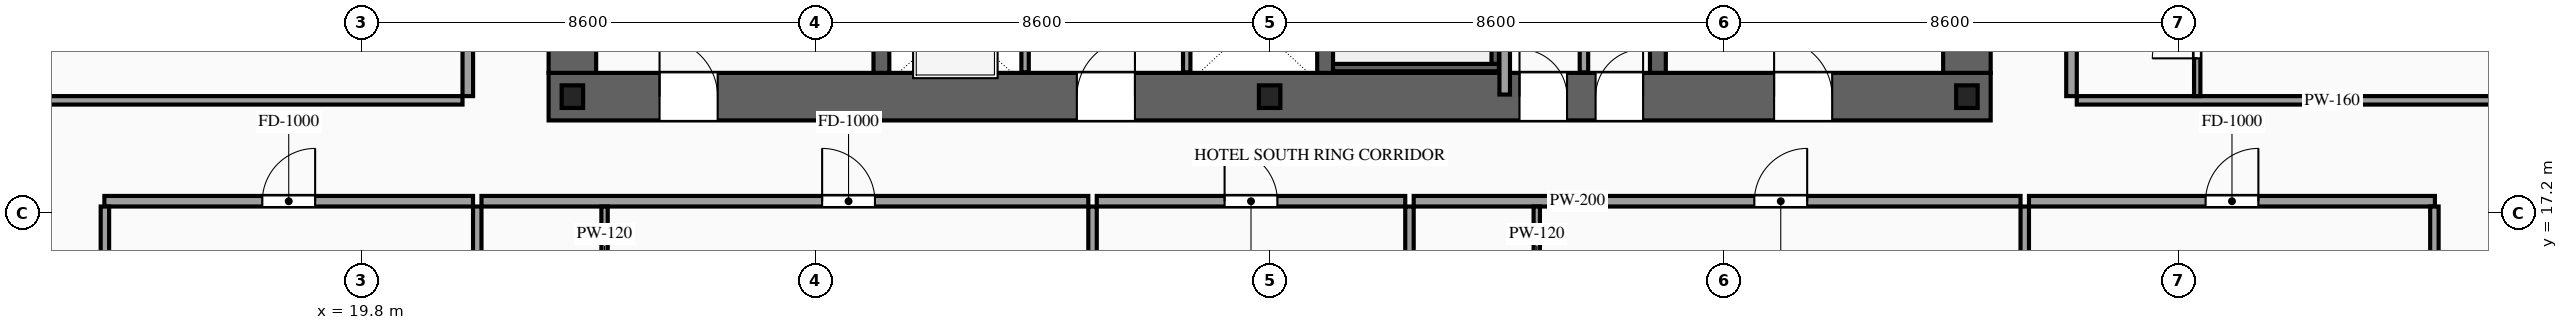
"""IFC4 building model, lengths in metres.
Left out: names, types, materials, properties, quantities, classifications, styles, units other than length and angle.
Written with IfcOpenShell. Run it as: python <this file> out.ifc"""

import sys

from ifc_helpers import new_model, si_unit, direction, frame, frame_2d, origin, origin_2d, place, context, subcontext, project, spatial, rectangle, i_section, extrude, source, transform, mapped, element, fill, save


model = new_model("IFC4")
c1 = context("Model", 3, precision=1e-05, world=origin(), true_north=direction((0.0, 1.0)))
c2 = subcontext(c1, "Body", "Model", "MODEL_VIEW")
j1 = project(units=[si_unit("LENGTHUNIT", "METRE"), si_unit("PLANEANGLEUNIT", "RADIAN")], contexts=[c1])
p1 = place(None, origin())
s1 = spatial("IfcSite", under=j1, at=p1, CompositionType="ELEMENT")
p2 = place(p1, origin())
s2 = spatial("IfcBuilding", under=s1, at=p2, CompositionType="ELEMENT")
p3 = place(p2, frame((0.0, 0.0, 78.4)))
s3 = spatial("IfcBuildingStorey", under=s2, at=p3, CompositionType="ELEMENT", Elevation=78.4)
p4 = place(p3, frame((23.35, 19.4, 0.0), z_axis=(0.0, 0.0, 1.0), x_axis=(1.0, 0.0, 0.0)))
e1 = element("IfcWall", 1, at=p4, inside=s3, PredefinedType="SHEAR", context=c2, shape_type="SweptSolid", body=[
    extrude(rectangle(XDim=27.3, YDim=0.9, at=frame_2d((13.65, 0.0))), origin(), (0.0, 0.0, 1.0), 3.6),
])
p5 = place(p4, frame((2.1, 0.0, 0.0)))
e2 = element("IfcOpeningElement", 2, at=p5, cuts=e1, PredefinedType="OPENING", context=c2, shape_type="SweptSolid", body=[
    extrude(rectangle(XDim=1.1, YDim=2.2, at=frame_2d((0.55, 1.1))), frame((0.0, 0.465, 0.0), z_axis=(0.0, -1.0, 0.0), x_axis=(1.0, 0.0, 0.0)), (0.0, 0.0, 1.0), 0.93),
])
p6 = place(p4, frame((10.0, 0.0, 0.0)))
e3 = element("IfcOpeningElement", 3, at=p6, cuts=e1, PredefinedType="OPENING", context=c2, shape_type="SweptSolid", body=[
    extrude(rectangle(XDim=1.1, YDim=2.2, at=frame_2d((0.55, 1.1))), frame((0.0, 0.465, 0.0), z_axis=(0.0, -1.0, 0.0), x_axis=(1.0, 0.0, 0.0)), (0.0, 0.0, 1.0), 0.93),
])
p7 = place(p4, frame((23.2, 0.0, 0.0)))
e4 = element("IfcOpeningElement", 4, at=p7, cuts=e1, PredefinedType="OPENING", context=c2, shape_type="SweptSolid", body=[
    extrude(rectangle(XDim=1.1, YDim=2.2, at=frame_2d((0.55, 1.1))), frame((0.0, 0.465, 0.0), z_axis=(0.0, -1.0, 0.0), x_axis=(1.0, 0.0, 0.0)), (0.0, 0.0, 1.0), 0.93),
])
p8 = place(p4, frame((19.82, 0.0, 0.0)))
e5 = element("IfcOpeningElement", 5, at=p8, cuts=e1, PredefinedType="OPENING", context=c2, shape_type="SweptSolid", body=[
    extrude(rectangle(XDim=0.9, YDim=2.15, at=frame_2d((0.45, 1.075))), frame((0.0, 0.465, 0.0), z_axis=(0.0, -1.0, 0.0), x_axis=(1.0, 0.0, 0.0)), (0.0, 0.0, 1.0), 0.93),
])
p9 = place(p4, frame((18.38, 0.0, 0.0)))
e6 = element("IfcOpeningElement", 6, at=p9, cuts=e1, PredefinedType="OPENING", context=c2, shape_type="SweptSolid", body=[
    extrude(rectangle(XDim=0.9, YDim=2.15, at=frame_2d((0.45, 1.075))), frame((0.0, 0.465, 0.0), z_axis=(0.0, -1.0, 0.0), x_axis=(1.0, 0.0, 0.0)), (0.0, 0.0, 1.0), 0.93),
])
m1 = source(origin(), c2, "Body", "SweptSolid", [
    extrude(rectangle(XDim=11.9, YDim=0.9, at=frame_2d((5.95, 0.0))), origin(), (0.0, 0.0, 1.0), 3.6),
])
for number, where, z_axis, x_axis in (
    (7, (23.8, 19.85, 0.0), (0.0, 0.0, 1.0), (0.0, 1.0, 0.0)),
    (8, (50.2, 19.85, 0.0), (0.0, 0.0, 1.0), (0.0, 1.0, 0.0)),
):
    element("IfcWall", number, at=place(p3, frame(where, z_axis=z_axis, x_axis=x_axis)), inside=s3, PredefinedType="SHEAR", context=c2, shape_type="MappedRepresentation", body=[
        mapped(m1, transform((0.0, 0.0, 0.0), scale=1.0)),
    ])
m2 = source(origin(), c2, "Body", "SweptSolid", [
    extrude(rectangle(XDim=11.9, YDim=0.3, at=frame_2d((5.95, 0.0))), origin(), (0.0, 0.0, 1.0), 3.6),
])
for number, where, z_axis, x_axis in (
    (9, (29.65, 19.85, 0.0), (0.0, 0.0, 1.0), (0.0, 1.0, 0.0)),
    (10, (38.05, 19.85, 0.0), (0.0, 0.0, 1.0), (0.0, 1.0, 0.0)),
    (11, (44.35, 19.85, 0.0), (0.0, 0.0, 1.0), (0.0, 1.0, 0.0)),
):
    element("IfcWall", number, at=place(p3, frame(where, z_axis=z_axis, x_axis=x_axis)), inside=s3, PredefinedType="SOLIDWALL", context=c2, shape_type="MappedRepresentation", body=[
        mapped(m2, transform((0.0, 0.0, 0.0), scale=1.0)),
    ])
m3 = source(origin(), c2, "Body", "SweptSolid", [
    extrude(i_section(OverallWidth=0.407, OverallDepth=0.428, WebThickness=0.02, FlangeThickness=0.035, at=origin_2d()), origin(), (0.0, 0.0, 1.0), 3.6),
])
for number, where, z_axis, x_axis in (
    (12, (23.8, 19.4, 0.0), (0.0, 0.0, 1.0), (1.0, 0.0, 0.0)),
    (13, (37.0, 19.4, 0.0), (0.0, 0.0, 1.0), (1.0, 0.0, 0.0)),
    (14, (50.2, 19.4, 0.0), (0.0, 0.0, 1.0), (1.0, 0.0, 0.0)),
):
    element("IfcColumn", number, at=place(p3, frame(where, z_axis=z_axis, x_axis=x_axis)), inside=s3, PredefinedType="COLUMN", context=c2, shape_type="MappedRepresentation", body=[
        mapped(m3, transform((0.0, 0.0, 0.0), scale=1.0)),
    ])
p10 = place(p3, frame((32.37, 19.86, 0.0), z_axis=(0.0, 0.0, 1.0), x_axis=(0.0, 1.0, 0.0)))
e15 = element("IfcWall", 15, at=p10, inside=s3, PredefinedType="SOLIDWALL", context=c2, shape_type="SweptSolid", body=[
    extrude(rectangle(XDim=2.04, YDim=0.14, at=frame_2d((1.02, 0.0))), origin(), (0.0, 0.0, 1.0), 3.38),
])
p11 = place(p10, frame((0.47, 0.0, 0.0)))
e16 = element("IfcOpeningElement", 16, at=p11, cuts=e15, PredefinedType="OPENING", context=c2, shape_type="SweptSolid", body=[
    extrude(rectangle(XDim=1.1, YDim=2.2, at=frame_2d((0.55, 1.1))), frame((0.0, 0.085, 0.0), z_axis=(0.0, -1.0, 0.0), x_axis=(1.0, 0.0, 0.0)), (0.0, 0.0, 1.0), 0.17),
])
m4 = source(origin(), c2, "Body", "SweptSolid", [
    extrude(rectangle(XDim=2.04, YDim=0.14, at=frame_2d((1.02, 0.0))), origin(), (0.0, 0.0, 1.0), 3.38),
])
p12 = place(p3, frame((35.43, 19.86, 0.0), z_axis=(0.0, 0.0, 1.0), x_axis=(0.0, 1.0, 0.0)))
e17 = element("IfcWall", 17, at=p12, inside=s3, PredefinedType="SOLIDWALL", context=c2, shape_type="MappedRepresentation", body=[
    mapped(m4, transform((0.0, 0.0, 0.0), scale=1.0)),
])
m5 = source(origin(), c2, "Body", "SweptSolid", [
    extrude(rectangle(XDim=3.14, YDim=0.14, at=frame_2d((1.57, 0.0))), origin(), (0.0, 0.0, 1.0), 3.38),
])
p13 = place(p3, frame((38.2, 19.95, 0.0), z_axis=(0.0, 0.0, 1.0), x_axis=(1.0, 0.0, 0.0)))
e18 = element("IfcWall", 18, at=p13, inside=s3, PredefinedType="SOLIDWALL", context=c2, shape_type="MappedRepresentation", body=[
    mapped(m5, transform((0.0, 0.0, 0.0), scale=1.0)),
])
m6 = source(origin(), c2, "Body", "SweptSolid", [
    extrude(rectangle(XDim=8.94, YDim=0.14, at=frame_2d((4.47, 0.0))), origin(), (0.0, 0.0, 1.0), 3.38),
])
p14 = place(p3, frame((41.27, 20.02, 0.0), z_axis=(0.0, 0.0, 1.0), x_axis=(0.0, 1.0, 0.0)))
e19 = element("IfcWall", 19, at=p14, inside=s3, PredefinedType="SOLIDWALL", context=c2, shape_type="MappedRepresentation", body=[
    mapped(m6, transform((0.0, 0.0, 0.0), scale=1.0)),
])
m7 = source(origin(), c2, "Body", "SweptSolid", [
    extrude(rectangle(XDim=1.34, YDim=0.16, at=frame_2d((0.67, 0.0))), origin(), (0.0, 0.0, 1.0), 3.38),
])
p15 = place(p3, frame((42.95, 19.86, 0.0), z_axis=(0.0, 0.0, 1.0), x_axis=(0.0, 1.0, 0.0)))
e20 = element("IfcWall", 20, at=p15, inside=s3, PredefinedType="PARTITIONING", context=c2, shape_type="MappedRepresentation", body=[
    mapped(m7, transform((0.0, 0.0, 0.0), scale=1.0)),
])
m8 = source(origin(), c2, "Body", "SweptSolid", [
    extrude(rectangle(XDim=12.72, YDim=0.2, at=frame_2d((6.36, 0.0))), origin(), (0.0, 0.0, 1.0), 3.38),
])
p16 = place(p3, frame((41.45, 19.44, 0.0), z_axis=(0.0, 0.0, 1.0), x_axis=(0.0, 1.0, 0.0)))
e21 = element("IfcWall", 21, at=p16, inside=s3, PredefinedType="PARTITIONING", context=c2, shape_type="MappedRepresentation", body=[
    mapped(m8, transform((0.0, 0.0, 0.0), scale=1.0)),
])
p17 = place(p3, frame((14.94, 17.42, 0.0), z_axis=(0.0, 0.0, 1.0), x_axis=(1.0, 0.0, 0.0)))
e22 = element("IfcWall", 22, at=p17, inside=s3, PredefinedType="PARTITIONING", context=c2, shape_type="SweptSolid", body=[
    extrude(rectangle(XDim=6.979, YDim=0.2, at=frame_2d((3.49, 0.0))), origin(), (0.0, 0.0, 1.0), 3.38),
])
p18 = place(p17, frame((2.99, 0.0, 0.0)))
e23 = element("IfcOpeningElement", 23, at=p18, cuts=e22, PredefinedType="OPENING", context=c2, shape_type="SweptSolid", body=[
    extrude(rectangle(XDim=1.0, YDim=2.2, at=frame_2d((0.5, 1.1))), frame((0.0, 0.115, 0.0), z_axis=(0.0, -1.0, 0.0), x_axis=(1.0, 0.0, 0.0)), (0.0, 0.0, 1.0), 0.23),
])
m9 = source(origin(), c2, "Body", "SweptSolid", [
    extrude(rectangle(XDim=16.47, YDim=0.16, at=frame_2d((8.235, 0.0))), origin(), (0.0, 0.0, 1.0), 3.38),
])
p19 = place(p3, frame((21.999, 0.85, 0.0), z_axis=(0.0, 0.0, 1.0), x_axis=(0.0, 1.0, 0.0)))
e24 = element("IfcWall", 24, at=p19, inside=s3, PredefinedType="PARTITIONING", context=c2, shape_type="MappedRepresentation", body=[
    mapped(m9, transform((0.0, 0.0, 0.0), scale=1.0)),
])
p20 = place(p3, frame((22.079, 17.42, 0.0), z_axis=(0.0, 0.0, 1.0), x_axis=(1.0, 0.0, 0.0)))
e25 = element("IfcWall", 25, at=p20, inside=s3, PredefinedType="PARTITIONING", context=c2, shape_type="SweptSolid", body=[
    extrude(rectangle(XDim=11.488, YDim=0.2, at=frame_2d((5.744, 0.0))), origin(), (0.0, 0.0, 1.0), 3.38),
])
p21 = place(p20, frame((6.449, 0.0, 0.0)))
e26 = element("IfcOpeningElement", 26, at=p21, cuts=e25, PredefinedType="OPENING", context=c2, shape_type="SweptSolid", body=[
    extrude(rectangle(XDim=1.0, YDim=2.2, at=frame_2d((0.5, 1.1))), frame((0.0, 0.115, 0.0), z_axis=(0.0, -1.0, 0.0), x_axis=(1.0, 0.0, 0.0)), (0.0, 0.0, 1.0), 0.23),
])
p22 = place(p3, frame((33.647, 0.85, 0.0), z_axis=(0.0, 0.0, 1.0), x_axis=(0.0, 1.0, 0.0)))
e27 = element("IfcWall", 27, at=p22, inside=s3, PredefinedType="PARTITIONING", context=c2, shape_type="MappedRepresentation", body=[
    mapped(m9, transform((0.0, 0.0, 0.0), scale=1.0)),
])
m10 = source(origin(), c2, "Body", "SweptSolid", [
    extrude(rectangle(XDim=2.42, YDim=0.12, at=frame_2d((1.21, 0.0))), origin(), (0.0, 0.0, 1.0), 3.38),
])
p23 = place(p3, frame((24.409, 14.9, 0.0), z_axis=(0.0, 0.0, 1.0), x_axis=(0.0, 1.0, 0.0)))
e28 = element("IfcWall", 28, at=p23, inside=s3, PredefinedType="PARTITIONING", context=c2, shape_type="MappedRepresentation", body=[
    mapped(m10, transform((0.0, 0.0, 0.0), scale=1.0)),
])
p24 = place(p3, frame((33.727, 17.42, 0.0), z_axis=(0.0, 0.0, 1.0), x_axis=(1.0, 0.0, 0.0)))
e29 = element("IfcWall", 29, at=p24, inside=s3, PredefinedType="PARTITIONING", context=c2, shape_type="SweptSolid", body=[
    extrude(rectangle(XDim=5.84, YDim=0.2, at=frame_2d((2.92, 0.0))), origin(), (0.0, 0.0, 1.0), 3.38),
])
p25 = place(p24, frame((2.42, 0.0, 0.0)))
e30 = element("IfcOpeningElement", 30, at=p25, cuts=e29, PredefinedType="OPENING", context=c2, shape_type="SweptSolid", body=[
    extrude(rectangle(XDim=1.0, YDim=2.2, at=frame_2d((0.5, 1.1))), frame((0.0, 0.115, 0.0), z_axis=(0.0, -1.0, 0.0), x_axis=(1.0, 0.0, 0.0)), (0.0, 0.0, 1.0), 0.23),
])
p26 = place(p3, frame((39.647, 0.85, 0.0), z_axis=(0.0, 0.0, 1.0), x_axis=(0.0, 1.0, 0.0)))
e31 = element("IfcWall", 31, at=p26, inside=s3, PredefinedType="PARTITIONING", context=c2, shape_type="MappedRepresentation", body=[
    mapped(m9, transform((0.0, 0.0, 0.0), scale=1.0)),
])
p27 = place(p3, frame((39.727, 17.42, 0.0), z_axis=(0.0, 0.0, 1.0), x_axis=(1.0, 0.0, 0.0)))
e32 = element("IfcWall", 32, at=p27, inside=s3, PredefinedType="PARTITIONING", context=c2, shape_type="SweptSolid", body=[
    extrude(rectangle(XDim=11.488, YDim=0.2, at=frame_2d((5.744, 0.0))), origin(), (0.0, 0.0, 1.0), 3.38),
])
p28 = place(p27, frame((6.449, 0.0, 0.0)))
e33 = element("IfcOpeningElement", 33, at=p28, cuts=e32, PredefinedType="OPENING", context=c2, shape_type="SweptSolid", body=[
    extrude(rectangle(XDim=1.0, YDim=2.2, at=frame_2d((0.5, 1.1))), frame((0.0, 0.115, 0.0), z_axis=(0.0, -1.0, 0.0), x_axis=(1.0, 0.0, 0.0)), (0.0, 0.0, 1.0), 0.23),
])
p29 = place(p3, frame((51.295, 0.85, 0.0), z_axis=(0.0, 0.0, 1.0), x_axis=(0.0, 1.0, 0.0)))
e34 = element("IfcWall", 34, at=p29, inside=s3, PredefinedType="PARTITIONING", context=c2, shape_type="MappedRepresentation", body=[
    mapped(m9, transform((0.0, 0.0, 0.0), scale=1.0)),
])
p30 = place(p3, frame((42.057, 14.9, 0.0), z_axis=(0.0, 0.0, 1.0), x_axis=(0.0, 1.0, 0.0)))
e35 = element("IfcWall", 35, at=p30, inside=s3, PredefinedType="PARTITIONING", context=c2, shape_type="MappedRepresentation", body=[
    mapped(m10, transform((0.0, 0.0, 0.0), scale=1.0)),
])
p31 = place(p3, frame((51.375, 17.42, 0.0), z_axis=(0.0, 0.0, 1.0), x_axis=(1.0, 0.0, 0.0)))
e36 = element("IfcWall", 36, at=p31, inside=s3, PredefinedType="PARTITIONING", context=c2, shape_type="SweptSolid", body=[
    extrude(rectangle(XDim=7.685, YDim=0.2, at=frame_2d((3.843, 0.0))), origin(), (0.0, 0.0, 1.0), 3.38),
])
p32 = place(p31, frame((3.343, 0.0, 0.0)))
e37 = element("IfcOpeningElement", 37, at=p32, cuts=e36, PredefinedType="OPENING", context=c2, shape_type="SweptSolid", body=[
    extrude(rectangle(XDim=1.0, YDim=2.2, at=frame_2d((0.5, 1.1))), frame((0.0, 0.115, 0.0), z_axis=(0.0, -1.0, 0.0), x_axis=(1.0, 0.0, 0.0)), (0.0, 0.0, 1.0), 0.23),
])
m11 = source(origin(), c2, "Body", "SweptSolid", [
    extrude(rectangle(XDim=16.32, YDim=0.16, at=frame_2d((8.16, 0.0))), origin(), (0.0, 0.0, 1.0), 3.38),
])
for number, where, z_axis, x_axis in (
    (38, (14.95, 1.0, 0.0), (0.0, 0.0, 1.0), (0.0, 1.0, 0.0)),
    (39, (59.05, 1.0, 0.0), (0.0, 0.0, 1.0), (0.0, 1.0, 0.0)),
):
    element("IfcWall", number, at=place(p3, frame(where, z_axis=z_axis, x_axis=x_axis)), inside=s3, PredefinedType="PARTITIONING", context=c2, shape_type="MappedRepresentation", body=[
        mapped(m11, transform((0.0, 0.0, 0.0), scale=1.0)),
    ])
p33 = place(p3, frame((21.82, 19.41, 0.0), z_axis=(0.0, 0.0, 1.0), x_axis=(0.0, 1.0, 0.0)))
e40 = element("IfcWall", 40, at=p33, inside=s3, PredefinedType="PARTITIONING", context=c2, shape_type="SweptSolid", body=[
    extrude(rectangle(XDim=6.31, YDim=0.2, at=frame_2d((3.155, 0.0))), origin(), (0.0, 0.0, 1.0), 3.38),
])
p34 = place(p33, frame((2.655, 0.0, 0.0)))
e41 = element("IfcOpeningElement", 41, at=p34, cuts=e40, PredefinedType="OPENING", context=c2, shape_type="SweptSolid", body=[
    extrude(rectangle(XDim=1.0, YDim=2.2, at=frame_2d((0.5, 1.1))), frame((0.0, 0.115, 0.0), z_axis=(0.0, -1.0, 0.0), x_axis=(1.0, 0.0, 0.0)), (0.0, 0.0, 1.0), 0.23),
])
m12 = source(origin(), c2, "Body", "SweptSolid", [
    extrude(rectangle(XDim=9.67, YDim=0.16, at=frame_2d((4.835, 0.0))), origin(), (0.0, 0.0, 1.0), 2.875),
])
p35 = place(p3, frame((12.05, 19.33, 0.0), z_axis=(0.0, 0.0, 1.0), x_axis=(1.0, 0.0, 0.0)))
e42 = element("IfcWall", 42, at=p35, inside=s3, PredefinedType="PARTITIONING", context=c2, shape_type="MappedRepresentation", body=[
    mapped(m12, transform((0.0, 0.0, 0.0), scale=1.0)),
])
p36 = place(p3, frame((52.18, 19.41, 0.0), z_axis=(0.0, 0.0, 1.0), x_axis=(0.0, 1.0, 0.0)))
e43 = element("IfcWall", 43, at=p36, inside=s3, PredefinedType="PARTITIONING", context=c2, shape_type="SweptSolid", body=[
    extrude(rectangle(XDim=6.31, YDim=0.2, at=frame_2d((3.155, 0.0))), origin(), (0.0, 0.0, 1.0), 3.38),
])
p37 = place(p36, frame((3.835, 0.0, 0.0)))
e44 = element("IfcOpeningElement", 44, at=p37, cuts=e43, PredefinedType="OPENING", context=c2, shape_type="SweptSolid", body=[
    extrude(rectangle(XDim=1.0, YDim=2.2, at=frame_2d((0.5, 1.1))), frame((0.0, 0.115, 0.0), z_axis=(0.0, -1.0, 0.0), x_axis=(1.0, 0.0, 0.0)), (0.0, 0.0, 1.0), 0.23),
])
p38 = place(p3, frame((52.28, 19.33, 0.0), z_axis=(0.0, 0.0, 1.0), x_axis=(1.0, 0.0, 0.0)))
e45 = element("IfcWall", 45, at=p38, inside=s3, PredefinedType="PARTITIONING", context=c2, shape_type="MappedRepresentation", body=[
    mapped(m12, transform((0.0, 0.0, 0.0), scale=1.0)),
])
p39 = place(p3, frame((54.56, 19.41, 0.0), z_axis=(0.0, 0.0, 1.0), x_axis=(0.0, 1.0, 0.0)))
e46 = element("IfcWall", 46, at=p39, inside=s3, PredefinedType="PARTITIONING", context=c2, shape_type="SweptSolid", body=[
    extrude(rectangle(XDim=2.28, YDim=0.12, at=frame_2d((1.14, 0.0))), origin(), (0.0, 0.0, 1.0), 3.38),
])
p40 = place(p39, frame((0.715, 0.0, 0.0)))
e47 = element("IfcOpeningElement", 47, at=p40, cuts=e46, PredefinedType="OPENING", context=c2, shape_type="SweptSolid", body=[
    extrude(rectangle(XDim=0.85, YDim=2.1, at=frame_2d((0.425, 1.05))), frame((0.0, 0.075, 0.0), z_axis=(0.0, -1.0, 0.0), x_axis=(1.0, 0.0, 0.0)), (0.0, 0.0, 1.0), 0.15),
])
m13 = source(origin(), c2, "Body", "SweptSolid", [
    extrude(rectangle(XDim=1.1, YDim=2.2, at=frame_2d((0.55, 1.1))), frame((0.0, 0.025, 0.0), z_axis=(0.0, -1.0, 0.0), x_axis=(1.0, 0.0, 0.0)), (0.0, 0.0, 1.0), 0.05),
])
p41 = place(p5, origin())
e48 = element("IfcDoor", 48, at=p41, inside=s3, OperationType="SINGLE_SWING_LEFT", PredefinedType="DOOR", context=c2, shape_type="MappedRepresentation", body=[
    mapped(m13, transform((0.0, 0.0, 0.0), scale=1.0)),
])
fill(e2, e48)
p42 = place(p6, origin())
e49 = element("IfcDoor", 49, at=p42, inside=s3, OperationType="SINGLE_SWING_RIGHT", PredefinedType="DOOR", context=c2, shape_type="MappedRepresentation", body=[
    mapped(m13, transform((0.0, 0.0, 0.0), scale=1.0)),
])
fill(e3, e49)
p43 = place(p7, origin())
e50 = element("IfcDoor", 50, at=p43, inside=s3, OperationType="SINGLE_SWING_LEFT", PredefinedType="DOOR", context=c2, shape_type="MappedRepresentation", body=[
    mapped(m13, transform((0.0, 0.0, 0.0), scale=1.0)),
])
fill(e4, e50)
m14 = source(origin(), c2, "Body", "SweptSolid", [
    extrude(rectangle(XDim=0.9, YDim=2.15, at=frame_2d((0.45, 1.075))), frame((0.0, 0.025, 0.0), z_axis=(0.0, -1.0, 0.0), x_axis=(1.0, 0.0, 0.0)), (0.0, 0.0, 1.0), 0.05),
])
p44 = place(p8, origin())
e51 = element("IfcDoor", 51, at=p44, inside=s3, OperationType="SINGLE_SWING_RIGHT", PredefinedType="DOOR", context=c2, shape_type="MappedRepresentation", body=[
    mapped(m14, transform((0.0, 0.0, 0.0), scale=1.0)),
])
fill(e5, e51)
p45 = place(p9, origin())
e52 = element("IfcDoor", 52, at=p45, inside=s3, OperationType="SINGLE_SWING_LEFT", PredefinedType="DOOR", context=c2, shape_type="MappedRepresentation", body=[
    mapped(m14, transform((0.0, 0.0, 0.0), scale=1.0)),
])
fill(e6, e52)
m15 = source(origin(), c2, "Body", "SweptSolid", [
    extrude(rectangle(XDim=1.0, YDim=2.2, at=frame_2d((0.5, 1.1))), frame((0.0, 0.025, 0.0), z_axis=(0.0, -1.0, 0.0), x_axis=(1.0, 0.0, 0.0)), (0.0, 0.0, 1.0), 0.05),
])
p46 = place(p18, origin())
e53 = element("IfcDoor", 53, at=p46, inside=s3, OperationType="SINGLE_SWING_RIGHT", PredefinedType="DOOR", context=c2, shape_type="MappedRepresentation", body=[
    mapped(m15, transform((0.0, 0.0, 0.0), scale=1.0)),
])
fill(e23, e53)
p47 = place(p21, origin())
e54 = element("IfcDoor", 54, at=p47, inside=s3, OperationType="SINGLE_SWING_LEFT", PredefinedType="DOOR", context=c2, shape_type="MappedRepresentation", body=[
    mapped(m15, transform((0.0, 0.0, 0.0), scale=1.0)),
])
fill(e26, e54)
p48 = place(p25, origin())
e55 = element("IfcDoor", 55, at=p48, inside=s3, OperationType="SINGLE_SWING_LEFT", PredefinedType="DOOR", context=c2, shape_type="MappedRepresentation", body=[
    mapped(m15, transform((0.0, 0.0, 0.0), scale=1.0)),
])
fill(e30, e55)
p49 = place(p28, origin())
e56 = element("IfcDoor", 56, at=p49, inside=s3, OperationType="SINGLE_SWING_RIGHT", PredefinedType="DOOR", context=c2, shape_type="MappedRepresentation", body=[
    mapped(m15, transform((0.0, 0.0, 0.0), scale=1.0)),
])
fill(e33, e56)
p50 = place(p32, origin())
e57 = element("IfcDoor", 57, at=p50, inside=s3, OperationType="SINGLE_SWING_RIGHT", PredefinedType="DOOR", context=c2, shape_type="MappedRepresentation", body=[
    mapped(m15, transform((0.0, 0.0, 0.0), scale=1.0)),
])
fill(e37, e57)
m16 = source(origin(), c2, "Body", "SweptSolid", [
    extrude(rectangle(XDim=0.85, YDim=2.1, at=frame_2d((0.425, 1.05))), frame((0.0, 0.025, 0.0), z_axis=(0.0, -1.0, 0.0), x_axis=(1.0, 0.0, 0.0)), (0.0, 0.0, 1.0), 0.05),
])
p51 = place(p40, origin())
e58 = element("IfcDoor", 58, at=p51, inside=s3, OperationType="SINGLE_SWING_LEFT", PredefinedType="DOOR", context=c2, shape_type="MappedRepresentation", body=[
    mapped(m16, transform((0.0, 0.0, 0.0), scale=1.0)),
])
fill(e47, e58)
save(model, sys.argv[1])
